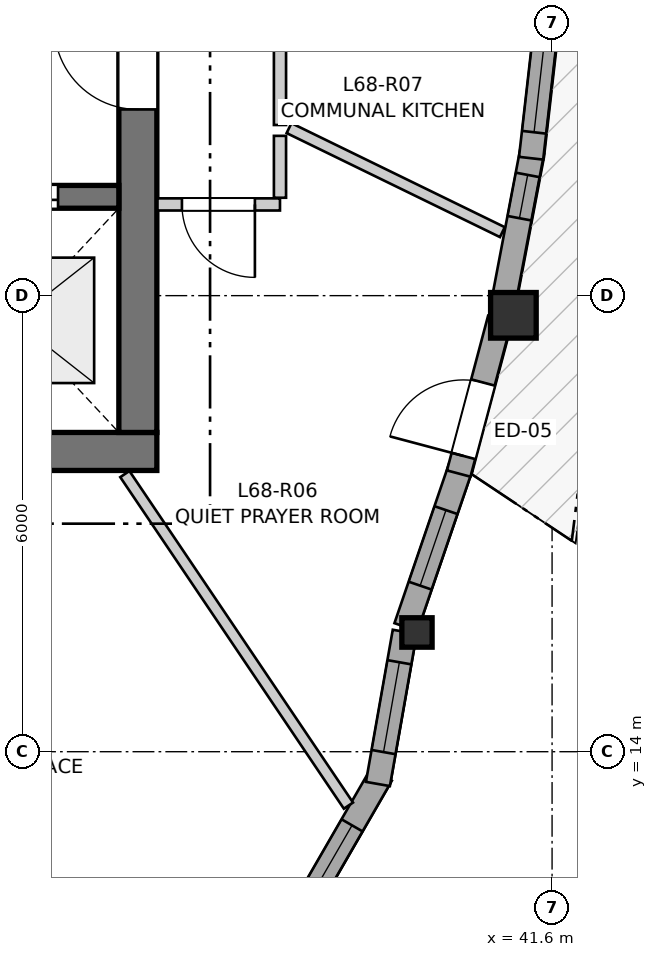
"""IFC4 building model, lengths in metres.
Left out: names, types, materials, properties, quantities, classifications, styles, units other than length and angle.
Written with IfcOpenShell. Run it as: python <this file> out.ifc"""

import sys

from ifc_helpers import new_model, si_unit, direction, frame, frame_2d, origin, origin_2d, place, context, subcontext, project, spatial, rectangle, i_section, extrude, source, transform, mapped, element, fill, save


model = new_model("IFC4")
c1 = context("Model", 3, precision=1e-05, world=origin(), true_north=direction((0.0, 1.0)))
c2 = subcontext(c1, "Body", "Model", "MODEL_VIEW")
j1 = project(units=[si_unit("LENGTHUNIT", "METRE"), si_unit("PLANEANGLEUNIT", "RADIAN")], contexts=[c1])
p1 = place(None, origin())
s1 = spatial("IfcSite", under=j1, at=p1, CompositionType="ELEMENT")
p2 = place(p1, origin())
s2 = spatial("IfcBuilding", under=s1, at=p2, CompositionType="ELEMENT")
p3 = place(p2, frame((0.0, 0.0, 227.6)))
s3 = spatial("IfcBuildingStorey", under=s2, at=p3, CompositionType="ELEMENT", Elevation=227.6)
p4 = place(p3, frame((24.3, 17.95, 0.0), z_axis=(0.0, 0.0, 1.0), x_axis=(1.0, 0.0, 0.0)))
e1 = element("IfcWall", 1, at=p4, inside=s3, PredefinedType="SHEAR", context=c2, shape_type="SweptSolid", body=[
    extrude(rectangle(XDim=12.1, YDim=0.5, at=frame_2d((6.05, 0.0))), origin(), (0.0, 0.0, 1.0), 2.96),
])
p5 = place(p3, frame((36.15, 18.2, 0.0), z_axis=(0.0, 0.0, 1.0), x_axis=(0.0, 1.0, 0.0)))
e2 = element("IfcWall", 2, at=p5, inside=s3, PredefinedType="SHEAR", context=c2, shape_type="SweptSolid", body=[
    extrude(rectangle(XDim=15.6, YDim=0.5, at=frame_2d((7.8, 0.0))), origin(), (0.0, 0.0, 1.0), 2.96),
])
p6 = place(p5, frame((4.25, 0.0, 0.0)))
e3 = element("IfcOpeningElement", 3, at=p6, cuts=e2, PredefinedType="OPENING", context=c2, shape_type="SweptSolid", body=[
    extrude(rectangle(XDim=1.1, YDim=2.15, at=frame_2d((0.55, 1.075))), frame((0.0, 0.26, 0.0), z_axis=(0.0, -1.0, 0.0), x_axis=(1.0, 0.0, 0.0)), (0.0, 0.0, 1.0), 0.52),
])
p7 = place(p5, frame((10.25, 0.0, 0.0)))
e4 = element("IfcOpeningElement", 4, at=p7, cuts=e2, PredefinedType="OPENING", context=c2, shape_type="SweptSolid", body=[
    extrude(rectangle(XDim=1.1, YDim=2.15, at=frame_2d((0.55, 1.075))), frame((0.0, 0.26, 0.0), z_axis=(0.0, -1.0, 0.0), x_axis=(1.0, 0.0, 0.0)), (0.0, 0.0, 1.0), 0.52),
])
p8 = place(p3, frame((24.8, 21.3, 0.0), z_axis=(0.0, 0.0, 1.0), x_axis=(1.0, 0.0, 0.0)))
e5 = element("IfcWall", 5, at=p8, inside=s3, PredefinedType="SHEAR", context=c2, shape_type="SweptSolid", body=[
    extrude(rectangle(XDim=11.1, YDim=0.3, at=frame_2d((5.55, 0.0))), origin(), (0.0, 0.0, 1.0), 2.96),
])
p9 = place(p8, frame((6.22, 0.0, 0.0)))
e6 = element("IfcOpeningElement", 6, at=p9, cuts=e5, PredefinedType="OPENING", context=c2, shape_type="SweptSolid", body=[
    extrude(rectangle(XDim=0.98, YDim=2.15, at=frame_2d((0.49, 1.075))), frame((0.0, 0.16, 0.0), z_axis=(0.0, -1.0, 0.0), x_axis=(1.0, 0.0, 0.0)), (0.0, 0.0, 1.0), 0.32),
])
p10 = place(p8, frame((9.15, 0.0, 0.0)))
e7 = element("IfcOpeningElement", 7, at=p10, cuts=e5, PredefinedType="OPENING", context=c2, shape_type="SweptSolid", body=[
    extrude(rectangle(XDim=1.15, YDim=2.15, at=frame_2d((0.575, 1.075))), frame((0.0, 0.16, 0.0), z_axis=(0.0, -1.0, 0.0), x_axis=(1.0, 0.0, 0.0)), (0.0, 0.0, 1.0), 0.32),
])
m1 = source(origin(), c2, "Body", "SweptSolid", [
    extrude(i_section(OverallWidth=0.398, OverallDepth=0.387, WebThickness=0.019, FlangeThickness=0.03, FilletRadius=0.015, at=origin_2d()), origin(), (0.0, 0.0, 1.0), 2.96),
])
p11 = place(p3, frame((39.823, 15.569, 0.0), z_axis=(0.0, 0.0, 1.0), x_axis=(1.0, 0.0, 0.0)))
e8 = element("IfcColumn", 8, at=p11, inside=s3, PredefinedType="PILASTER", context=c2, shape_type="MappedRepresentation", body=[
    mapped(m1, transform((0.0, 0.0, 0.0), x_axis=(1.0, 0.0, 0.0), y_axis=(0.0, 1.0, 0.0), z_axis=(0.0, 0.0, 1.0), scale=1.0)),
])
m2 = source(origin(), c2, "Body", "SweptSolid", [
    extrude(rectangle(XDim=0.6, YDim=0.6, at=origin_2d()), origin(), (0.0, 0.0, 1.0), 2.96),
])
p12 = place(p3, frame((41.091, 19.741, 0.0), z_axis=(0.0, 0.0, 1.0), x_axis=(1.0, 0.0, 0.0)))
e9 = element("IfcColumn", 9, at=p12, inside=s3, PredefinedType="COLUMN", context=c2, shape_type="MappedRepresentation", body=[
    mapped(m2, transform((0.0, 0.0, 0.0), x_axis=(1.0, 0.0, 0.0), y_axis=(0.0, 1.0, 0.0), z_axis=(0.0, 0.0, 1.0), scale=1.0)),
])
p13 = place(p3, frame((38.308, 11.888, 0.0), z_axis=(0.0, 0.0, 1.0), x_axis=(0.49990781971, 0.866078617559, 0.0)))
e10 = element("IfcWall", 10, at=p13, inside=s3, PredefinedType="SOLIDWALL", context=c2, shape_type="SweptSolid", body=[
    extrude(rectangle(XDim=2.09, YDim=0.32, at=frame_2d((1.045, 0.0))), origin(), (0.0, 0.0, 1.0), 2.58),
])
p14 = place(p13, frame((0.271, 0.0, 0.82)))
e11 = element("IfcOpeningElement", 11, at=p14, cuts=e10, PredefinedType="OPENING", context=c2, shape_type="SweptSolid", body=[
    extrude(rectangle(XDim=1.05, YDim=1.45, at=frame_2d((0.525, 0.725))), frame((0.0, 0.17, 0.0), z_axis=(0.0, -1.0, 0.0), x_axis=(1.0, 0.0, 0.0)), (0.0, 0.0, 1.0), 0.34),
])
p15 = place(p3, frame((39.309, 13.575, 0.0), z_axis=(0.0, 0.0, 1.0), x_axis=(0.17370309897, 0.984798067326, 0.0)))
e12 = element("IfcWall", 12, at=p15, inside=s3, PredefinedType="SOLIDWALL", context=c2, shape_type="SweptSolid", body=[
    extrude(rectangle(XDim=2.032, YDim=0.32, at=frame_2d((1.016, 0.0))), origin(), (0.0, 0.0, 1.0), 2.58),
])
p16 = place(p15, frame((0.426, 0.0, 0.82)))
e13 = element("IfcOpeningElement", 13, at=p16, cuts=e12, PredefinedType="OPENING", context=c2, shape_type="SweptSolid", body=[
    extrude(rectangle(XDim=1.2, YDim=1.45, at=frame_2d((0.6, 0.725))), frame((0.0, 0.17, 0.0), z_axis=(0.0, -1.0, 0.0), x_axis=(1.0, 0.0, 0.0)), (0.0, 0.0, 1.0), 0.34),
])
p17 = place(p3, frame((39.677, 15.639, 0.0), z_axis=(0.0, 0.0, 1.0), x_axis=(0.323664392341, 0.946171951143, 0.0)))
e14 = element("IfcWall", 14, at=p17, inside=s3, PredefinedType="SOLIDWALL", context=c2, shape_type="SweptSolid", body=[
    extrude(rectangle(XDim=2.223, YDim=0.32, at=frame_2d((1.111, 0.0))), origin(), (0.0, 0.0, 1.0), 2.58),
])
p18 = place(p17, frame((0.576, 0.0, 0.82)))
e15 = element("IfcOpeningElement", 15, at=p18, cuts=e14, PredefinedType="OPENING", context=c2, shape_type="SweptSolid", body=[
    extrude(rectangle(XDim=1.05, YDim=1.45, at=frame_2d((0.525, 0.725))), frame((0.0, 0.17, 0.0), z_axis=(0.0, -1.0, 0.0), x_axis=(1.0, 0.0, 0.0)), (0.0, 0.0, 1.0), 0.34),
])
p19 = place(p3, frame((40.372, 17.659, 0.0), z_axis=(0.0, 0.0, 1.0), x_axis=(0.2570422776, 0.966400159109, 0.0)))
e16 = element("IfcWall", 16, at=p19, inside=s3, PredefinedType="SOLIDWALL", context=c2, shape_type="SweptSolid", body=[
    extrude(rectangle(XDim=2.107, YDim=0.32, at=frame_2d((1.053, 0.0))), origin(), (0.0, 0.0, 1.0), 2.58),
])
p20 = place(p19, frame((0.24, 0.0, 0.0)))
e17 = element("IfcOpeningElement", 17, at=p20, cuts=e16, PredefinedType="OPENING", context=c2, shape_type="SweptSolid", body=[
    extrude(rectangle(XDim=1.0, YDim=2.1, at=frame_2d((0.5, 1.05))), frame((0.0, 0.17, 0.0), z_axis=(0.0, -1.0, 0.0), x_axis=(1.0, 0.0, 0.0)), (0.0, 0.0, 1.0), 0.34),
])
p21 = place(p3, frame((40.95, 19.86, 0.0), z_axis=(0.0, 0.0, 1.0), x_axis=(0.18667884524, 0.982420993638, 0.0)))
e18 = element("IfcWall", 18, at=p21, inside=s3, PredefinedType="SOLIDWALL", context=c2, shape_type="SweptSolid", body=[
    extrude(rectangle(XDim=2.072, YDim=0.32, at=frame_2d((1.036, 0.0))), origin(), (0.0, 0.0, 1.0), 2.58),
])
p22 = place(p21, frame((1.18, 0.0, 0.82)))
e19 = element("IfcOpeningElement", 19, at=p22, cuts=e18, PredefinedType="OPENING", context=c2, shape_type="SweptSolid", body=[
    extrude(rectangle(XDim=0.58, YDim=1.35, at=frame_2d((0.29, 0.675))), frame((0.0, 0.17, 0.0), z_axis=(0.0, -1.0, 0.0), x_axis=(1.0, 0.0, 0.0)), (0.0, 0.0, 1.0), 0.34),
])
p23 = place(p3, frame((41.324, 21.808, 0.0), z_axis=(0.0, 0.0, 1.0), x_axis=(0.113315758547, 0.993559026362, 0.0)))
e20 = element("IfcWall", 20, at=p23, inside=s3, PredefinedType="SOLIDWALL", context=c2, shape_type="SweptSolid", body=[
    extrude(rectangle(XDim=2.118, YDim=0.32, at=frame_2d((1.059, 0.0))), origin(), (0.0, 0.0, 1.0), 2.58),
])
p24 = place(p23, frame((0.344, 0.0, 0.82)))
e21 = element("IfcOpeningElement", 21, at=p24, cuts=e20, PredefinedType="OPENING", context=c2, shape_type="SweptSolid", body=[
    extrude(rectangle(XDim=1.45, YDim=1.25, at=frame_2d((0.725, 0.625))), frame((0.0, 0.17, 0.0), z_axis=(0.0, -1.0, 0.0), x_axis=(1.0, 0.0, 0.0)), (0.0, 0.0, 1.0), 0.34),
])
p25 = place(p3, frame((38.02, 25.659, 0.0), z_axis=(0.0, 0.0, 1.0), x_axis=(0.0, -1.0, 0.0)))
e22 = element("IfcWall", 22, at=p25, inside=s3, PredefinedType="PARTITIONING", context=c2, shape_type="SweptSolid", body=[
    extrude(rectangle(XDim=3.414, YDim=0.16, at=frame_2d((1.707, 0.0))), origin(), (0.0, 0.0, 1.0), 2.628),
])
p26 = place(p25, frame((1.033, 0.0, 0.0)))
e23 = element("IfcOpeningElement", 23, at=p26, cuts=e22, PredefinedType="OPENING", context=c2, shape_type="SweptSolid", body=[
    extrude(rectangle(XDim=1.3, YDim=2.1, at=frame_2d((0.65, 1.05))), frame((0.0, 0.09, 0.0), z_axis=(0.0, -1.0, 0.0), x_axis=(1.0, 0.0, 0.0)), (0.0, 0.0, 1.0), 0.18),
])
p27 = place(p3, frame((38.02, 21.2, 0.0), z_axis=(0.0, 0.0, 1.0), x_axis=(-1.0, 0.0, 0.0)))
e24 = element("IfcWall", 24, at=p27, inside=s3, PredefinedType="PARTITIONING", context=c2, shape_type="SweptSolid", body=[
    extrude(rectangle(XDim=1.612, YDim=0.16, at=frame_2d((0.806, 0.0))), origin(), (0.0, 0.0, 1.0), 2.96),
])
p28 = place(p27, frame((0.33, 0.0, 0.0)))
e25 = element("IfcOpeningElement", 25, at=p28, cuts=e24, PredefinedType="OPENING", context=c2, shape_type="SweptSolid", body=[
    extrude(rectangle(XDim=0.96, YDim=2.1, at=frame_2d((0.48, 1.05))), frame((0.0, 0.09, 0.0), z_axis=(0.0, -1.0, 0.0), x_axis=(1.0, 0.0, 0.0)), (0.0, 0.0, 1.0), 0.18),
])
p29 = place(p3, frame((35.979, 17.653, 0.0), z_axis=(0.0, 0.0, 1.0), x_axis=(0.559125350393, -0.829083133677, 0.0)))
e26 = element("IfcWall", 26, at=p29, inside=s3, PredefinedType="PARTITIONING", context=c2, shape_type="SweptSolid", body=[
    extrude(rectangle(XDim=5.262, YDim=0.145, at=frame_2d((2.631, 0.0))), origin(), (0.0, 0.0, 1.0), 2.96),
])
p30 = place(p3, frame((38.139, 22.204, 0.0), z_axis=(0.0, 0.0, 1.0), x_axis=(0.898869860356, -0.43821567081, 0.0)))
e27 = element("IfcWall", 27, at=p30, inside=s3, PredefinedType="PARTITIONING", context=c2, shape_type="SweptSolid", body=[
    extrude(rectangle(XDim=3.123, YDim=0.145, at=frame_2d((1.562, 0.0))), origin(), (0.0, 0.0, 1.0), 2.96),
])
p31 = place(p3, frame((38.02, 21.288, 0.0), z_axis=(0.0, 0.0, 1.0), x_axis=(0.0, 1.0, 0.0)))
e28 = element("IfcWall", 28, at=p31, inside=s3, PredefinedType="PARTITIONING", context=c2, shape_type="SweptSolid", body=[
    extrude(rectangle(XDim=0.814, YDim=0.16, at=frame_2d((0.407, 0.0))), origin(), (0.0, 0.0, 1.0), 2.628),
])
m3 = source(origin(), c2, "Body", "SweptSolid", [
    extrude(rectangle(XDim=1.05, YDim=1.45, at=frame_2d((0.525, 0.725))), frame((0.0, 0.03, 0.0), z_axis=(0.0, -1.0, 0.0), x_axis=(1.0, 0.0, 0.0)), (0.0, 0.0, 1.0), 0.06),
])
p32 = place(p14, origin())
e29 = element("IfcWindow", 29, at=p32, inside=s3, PartitioningType="SINGLE_PANEL", PredefinedType="WINDOW", context=c2, shape_type="MappedRepresentation", body=[
    mapped(m3, transform((0.0, 0.0, 0.0), x_axis=(1.0, 0.0, 0.0), y_axis=(0.0, 1.0, 0.0), z_axis=(0.0, 0.0, 1.0), scale=1.0)),
])
fill(e11, e29)
m4 = source(origin(), c2, "Body", "SweptSolid", [
    extrude(rectangle(XDim=1.2, YDim=1.45, at=frame_2d((0.6, 0.725))), frame((0.0, 0.03, 0.0), z_axis=(0.0, -1.0, 0.0), x_axis=(1.0, 0.0, 0.0)), (0.0, 0.0, 1.0), 0.06),
])
p33 = place(p16, origin())
e30 = element("IfcWindow", 30, at=p33, inside=s3, PartitioningType="SINGLE_PANEL", PredefinedType="WINDOW", context=c2, shape_type="MappedRepresentation", body=[
    mapped(m4, transform((0.0, 0.0, 0.0), x_axis=(1.0, 0.0, 0.0), y_axis=(0.0, 1.0, 0.0), z_axis=(0.0, 0.0, 1.0), scale=1.0)),
])
fill(e13, e30)
p34 = place(p18, origin())
e31 = element("IfcWindow", 31, at=p34, inside=s3, PartitioningType="SINGLE_PANEL", PredefinedType="WINDOW", context=c2, shape_type="MappedRepresentation", body=[
    mapped(m3, transform((0.0, 0.0, 0.0), x_axis=(1.0, 0.0, 0.0), y_axis=(0.0, 1.0, 0.0), z_axis=(0.0, 0.0, 1.0), scale=1.0)),
])
fill(e15, e31)
m5 = source(origin(), c2, "Body", "SweptSolid", [
    extrude(rectangle(XDim=0.58, YDim=1.35, at=frame_2d((0.29, 0.675))), frame((0.0, 0.03, 0.0), z_axis=(0.0, -1.0, 0.0), x_axis=(1.0, 0.0, 0.0)), (0.0, 0.0, 1.0), 0.06),
])
p35 = place(p22, origin())
e32 = element("IfcWindow", 32, at=p35, inside=s3, PartitioningType="SINGLE_PANEL", PredefinedType="WINDOW", context=c2, shape_type="MappedRepresentation", body=[
    mapped(m5, transform((0.0, 0.0, 0.0), x_axis=(1.0, 0.0, 0.0), y_axis=(0.0, 1.0, 0.0), z_axis=(0.0, 0.0, 1.0), scale=1.0)),
])
fill(e19, e32)
m6 = source(origin(), c2, "Body", "SweptSolid", [
    extrude(rectangle(XDim=1.45, YDim=1.25, at=frame_2d((0.725, 0.625))), frame((0.0, 0.03, 0.0), z_axis=(0.0, -1.0, 0.0), x_axis=(1.0, 0.0, 0.0)), (0.0, 0.0, 1.0), 0.06),
])
p36 = place(p24, origin())
e33 = element("IfcWindow", 33, at=p36, inside=s3, PartitioningType="SINGLE_PANEL", PredefinedType="WINDOW", context=c2, shape_type="MappedRepresentation", body=[
    mapped(m6, transform((0.0, 0.0, 0.0), x_axis=(1.0, 0.0, 0.0), y_axis=(0.0, 1.0, 0.0), z_axis=(0.0, 0.0, 1.0), scale=1.0)),
])
fill(e21, e33)
m7 = source(origin(), c2, "Body", "SweptSolid", [
    extrude(rectangle(XDim=1.0, YDim=2.1, at=frame_2d((0.5, 1.05))), frame((0.0, 0.025, 0.0), z_axis=(0.0, -1.0, 0.0), x_axis=(1.0, 0.0, 0.0)), (0.0, 0.0, 1.0), 0.05),
])
p37 = place(p20, origin())
e34 = element("IfcDoor", 34, at=p37, inside=s3, OperationType="SINGLE_SWING_LEFT", PredefinedType="DOOR", context=c2, shape_type="MappedRepresentation", body=[
    mapped(m7, transform((0.0, 0.0, 0.0), x_axis=(1.0, 0.0, 0.0), y_axis=(0.0, 1.0, 0.0), z_axis=(0.0, 0.0, 1.0), scale=1.0)),
])
fill(e17, e34)
m8 = source(origin(), c2, "Body", "SweptSolid", [
    extrude(rectangle(XDim=1.15, YDim=2.15, at=frame_2d((0.575, 1.075))), frame((0.0, 0.025, 0.0), z_axis=(0.0, -1.0, 0.0), x_axis=(1.0, 0.0, 0.0)), (0.0, 0.0, 1.0), 0.05),
])
p38 = place(p10, origin())
e35 = element("IfcDoor", 35, at=p38, inside=s3, OperationType="DOUBLE_DOOR_SLIDING", PredefinedType="DOOR", context=c2, shape_type="MappedRepresentation", body=[
    mapped(m8, transform((0.0, 0.0, 0.0), x_axis=(1.0, 0.0, 0.0), y_axis=(0.0, 1.0, 0.0), z_axis=(0.0, 0.0, 1.0), scale=1.0)),
])
fill(e7, e35)
m9 = source(origin(), c2, "Body", "SweptSolid", [
    extrude(rectangle(XDim=1.1, YDim=2.15, at=frame_2d((0.55, 1.075))), frame((0.0, 0.025, 0.0), z_axis=(0.0, -1.0, 0.0), x_axis=(1.0, 0.0, 0.0)), (0.0, 0.0, 1.0), 0.05),
])
p39 = place(p6, origin())
e36 = element("IfcDoor", 36, at=p39, inside=s3, OperationType="SINGLE_SWING_RIGHT", PredefinedType="DOOR", context=c2, shape_type="MappedRepresentation", body=[
    mapped(m9, transform((0.0, 0.0, 0.0), x_axis=(1.0, 0.0, 0.0), y_axis=(0.0, 1.0, 0.0), z_axis=(0.0, 0.0, 1.0), scale=1.0)),
])
fill(e3, e36)
m10 = source(origin(), c2, "Body", "SweptSolid", [
    extrude(rectangle(XDim=0.96, YDim=2.1, at=frame_2d((0.48, 1.05))), frame((0.0, 0.025, 0.0), z_axis=(0.0, -1.0, 0.0), x_axis=(1.0, 0.0, 0.0)), (0.0, 0.0, 1.0), 0.05),
])
p40 = place(p28, origin())
e37 = element("IfcDoor", 37, at=p40, inside=s3, OperationType="SINGLE_SWING_LEFT", PredefinedType="DOOR", context=c2, shape_type="MappedRepresentation", body=[
    mapped(m10, transform((0.0, 0.0, 0.0), x_axis=(1.0, 0.0, 0.0), y_axis=(0.0, 1.0, 0.0), z_axis=(0.0, 0.0, 1.0), scale=1.0)),
])
fill(e25, e37)
save(model, sys.argv[1])
